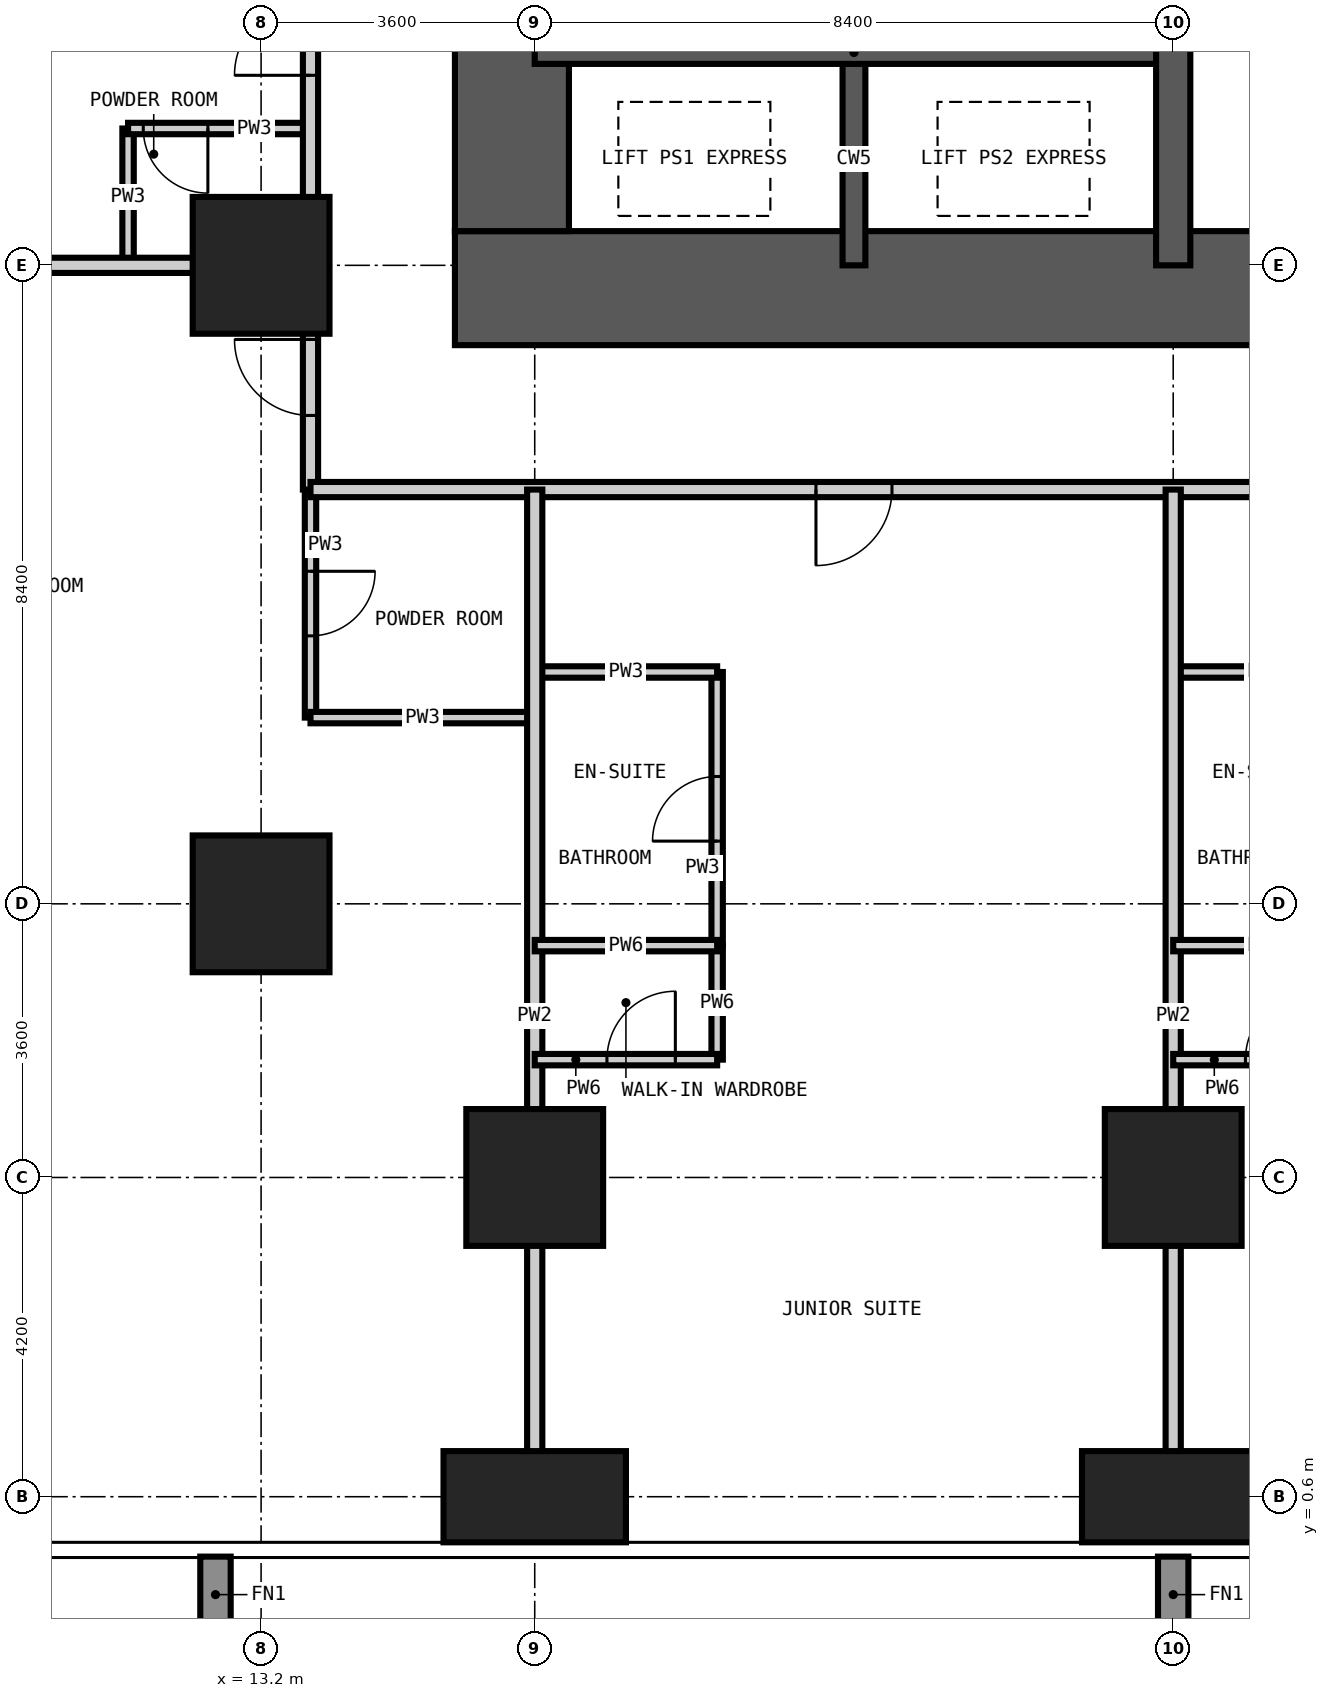
"""IFC4 building model, lengths in metres.
Left out: names, types, materials, properties, quantities, classifications, styles, units other than length and angle.
Written with IfcOpenShell. Run it as: python <this file> out.ifc"""

import sys

from ifc_helpers import new_model, si_unit, direction, frame, frame_2d, origin, origin_2d, place, context, subcontext, project, spatial, rectangle, extrude, element, fill, save


model = new_model("IFC4")
c1 = context("Model", 3, precision=1e-05, world=origin(), true_north=direction((0.0, 1.0)))
c2 = subcontext(c1, "Body", "Model", "MODEL_VIEW")
j1 = project(units=[si_unit("LENGTHUNIT", "METRE"), si_unit("PLANEANGLEUNIT", "RADIAN")], contexts=[c1])
p1 = place(None, origin())
s1 = spatial("IfcSite", under=j1, at=p1, CompositionType="ELEMENT")
p2 = place(p1, origin())
s2 = spatial("IfcBuilding", under=s1, at=p2, CompositionType="ELEMENT")
p3 = place(p2, frame((0.0, 0.0, 55.8)))
s3 = spatial("IfcBuildingStorey", under=s2, at=p3, CompositionType="ELEMENT", Elevation=55.8)
for number, where, z_axis, x_axis in (
    (1, (13.2, 8.4, -0.35), (0.0, 0.0, 1.0), (1.0, 0.0, 0.0)),
    (2, (13.2, 16.8, -0.35), (0.0, 0.0, 1.0), (1.0, 0.0, 0.0)),
):
    element("IfcColumn", number, at=place(p3, frame(where, z_axis=z_axis, x_axis=x_axis)), inside=s3, PredefinedType="COLUMN", context=c2, shape_type="SweptSolid", body=[
        extrude(rectangle(XDim=1.8, YDim=1.8, at=origin_2d()), origin(), (0.0, 0.0, 1.0), 3.6),
    ])
p4 = place(p3, frame((16.8, 0.6, -0.35), z_axis=(0.0, 0.0, 1.0), x_axis=(1.0, 0.0, 0.0)))
e3 = element("IfcColumn", 3, at=p4, inside=s3, PredefinedType="COLUMN", context=c2, shape_type="SweptSolid", body=[
    extrude(rectangle(XDim=2.4, YDim=1.2, at=origin_2d()), origin(), (0.0, 0.0, 1.0), 3.6),
])
p5 = place(p3, frame((16.8, 4.8, -0.35), z_axis=(0.0, 0.0, 1.0), x_axis=(1.0, 0.0, 0.0)))
e4 = element("IfcColumn", 4, at=p5, inside=s3, PredefinedType="COLUMN", context=c2, shape_type="SweptSolid", body=[
    extrude(rectangle(XDim=1.8, YDim=1.8, at=origin_2d()), origin(), (0.0, 0.0, 1.0), 3.6),
])
p6 = place(p3, frame((25.2, 0.6, -0.35), z_axis=(0.0, 0.0, 1.0), x_axis=(1.0, 0.0, 0.0)))
e5 = element("IfcColumn", 5, at=p6, inside=s3, PredefinedType="COLUMN", context=c2, shape_type="SweptSolid", body=[
    extrude(rectangle(XDim=2.4, YDim=1.2, at=origin_2d()), origin(), (0.0, 0.0, 1.0), 3.6),
])
p7 = place(p3, frame((25.2, 4.8, -0.35), z_axis=(0.0, 0.0, 1.0), x_axis=(1.0, 0.0, 0.0)))
e6 = element("IfcColumn", 6, at=p7, inside=s3, PredefinedType="COLUMN", context=c2, shape_type="SweptSolid", body=[
    extrude(rectangle(XDim=1.8, YDim=1.8, at=origin_2d()), origin(), (0.0, 0.0, 1.0), 3.6),
])
p8 = place(p3, frame((15.75, 16.5, -0.35), z_axis=(0.0, 0.0, 1.0), x_axis=(1.0, 0.0, 0.0)))
e7 = element("IfcWall", 7, at=p8, inside=s3, PredefinedType="SHEAR", context=c2, shape_type="SweptSolid", body=[
    extrude(rectangle(XDim=27.3, YDim=1.5, at=frame_2d((13.65, 0.0))), origin(), (0.0, 0.0, 1.0), 3.6),
])
p9 = place(p8, frame((13.15, 0.0, 0.35)))
e8 = element("IfcOpeningElement", 8, at=p9, cuts=e7, PredefinedType="OPENING", context=c2, shape_type="SweptSolid", body=[
    extrude(rectangle(XDim=1.0, YDim=2.1, at=frame_2d((0.5, 1.05))), frame((0.0, 0.76, 0.0), z_axis=(0.0, -1.0, 0.0), x_axis=(1.0, 0.0, 0.0)), (0.0, 0.0, 1.0), 1.52),
])
p10 = place(p8, frame((19.45, 0.0, 0.35)))
e9 = element("IfcOpeningElement", 9, at=p10, cuts=e7, PredefinedType="OPENING", context=c2, shape_type="SweptSolid", body=[
    extrude(rectangle(XDim=1.0, YDim=2.1, at=frame_2d((0.5, 1.05))), frame((0.0, 0.76, 0.0), z_axis=(0.0, -1.0, 0.0), x_axis=(1.0, 0.0, 0.0)), (0.0, 0.0, 1.0), 1.52),
])
p11 = place(p3, frame((16.5, 41.55, -0.35), z_axis=(0.0, 0.0, 1.0), x_axis=(0.0, -1.0, 0.0)))
e10 = element("IfcWall", 10, at=p11, inside=s3, PredefinedType="SHEAR", context=c2, shape_type="SweptSolid", body=[
    extrude(rectangle(XDim=24.3, YDim=1.5, at=frame_2d((12.15, 0.0))), origin(), (0.0, 0.0, 1.0), 3.6),
])
p12 = place(p11, frame((11.25, 0.0, 0.35)))
e11 = element("IfcOpeningElement", 11, at=p12, cuts=e10, PredefinedType="OPENING", context=c2, shape_type="SweptSolid", body=[
    extrude(rectangle(XDim=1.8, YDim=2.2, at=frame_2d((0.9, 1.1))), frame((0.0, 0.76, 0.0), z_axis=(0.0, -1.0, 0.0), x_axis=(1.0, 0.0, 0.0)), (0.0, 0.0, 1.0), 1.52),
])
p13 = place(p11, frame((20.05, 0.0, 0.35)))
e12 = element("IfcOpeningElement", 12, at=p13, cuts=e10, PredefinedType="OPENING", context=c2, shape_type="SweptSolid", body=[
    extrude(rectangle(XDim=1.0, YDim=2.1, at=frame_2d((0.5, 1.05))), frame((0.0, 0.76, 0.0), z_axis=(0.0, -1.0, 0.0), x_axis=(1.0, 0.0, 0.0)), (0.0, 0.0, 1.0), 1.52),
])
p14 = place(p11, frame((5.35, 0.0, 0.35)))
e13 = element("IfcOpeningElement", 13, at=p14, cuts=e10, PredefinedType="OPENING", context=c2, shape_type="SweptSolid", body=[
    extrude(rectangle(XDim=1.0, YDim=2.1, at=frame_2d((0.5, 1.05))), frame((0.0, 0.76, 0.0), z_axis=(0.0, -1.0, 0.0), x_axis=(1.0, 0.0, 0.0)), (0.0, 0.0, 1.0), 1.52),
])
p15 = place(p3, frame((21.0, 16.8, -0.35), z_axis=(0.0, 0.0, 1.0), x_axis=(0.0, 1.0, 0.0)))
e14 = element("IfcWall", 14, at=p15, inside=s3, PredefinedType="SHEAR", context=c2, shape_type="SweptSolid", body=[
    extrude(rectangle(XDim=2.8, YDim=0.3, at=frame_2d((1.4, 0.0))), origin(), (0.0, 0.0, 1.0), 3.6),
])
p16 = place(p3, frame((16.8, 19.6, -0.35), z_axis=(0.0, 0.0, 1.0), x_axis=(1.0, 0.0, 0.0)))
e15 = element("IfcWall", 15, at=p16, inside=s3, PredefinedType="SHEAR", context=c2, shape_type="SweptSolid", body=[
    extrude(rectangle(XDim=8.4, YDim=0.3, at=frame_2d((4.2, 0.0))), origin(), (0.0, 0.0, 1.0), 3.6),
])
p17 = place(p3, frame((25.2, 16.8, -0.35), z_axis=(0.0, 0.0, 1.0), x_axis=(0.0, 1.0, 0.0)))
e16 = element("IfcWall", 16, at=p17, inside=s3, PredefinedType="SHEAR", context=c2, shape_type="SweptSolid", body=[
    extrude(rectangle(XDim=25.2, YDim=0.45, at=frame_2d((12.6, 0.0))), origin(), (0.0, 0.0, 1.0), 3.6),
])
p18 = place(p3, frame((11.45, 16.8, 0.0), z_axis=(0.0, 0.0, 1.0), x_axis=(0.0, 1.0, 0.0)))
e17 = element("IfcWall", 17, at=p18, inside=s3, PredefinedType="PARTITIONING", context=c2, shape_type="SweptSolid", body=[
    extrude(rectangle(XDim=1.8, YDim=0.15, at=frame_2d((0.9, 0.0))), origin(), (0.0, 0.0, 1.0), 3.25),
])
p19 = place(p3, frame((13.85, 10.85, 0.0), z_axis=(0.0, 0.0, 1.0), x_axis=(0.0, 1.0, 0.0)))
e18 = element("IfcWall", 18, at=p19, inside=s3, PredefinedType="PARTITIONING", context=c2, shape_type="SweptSolid", body=[
    extrude(rectangle(XDim=3.0, YDim=0.15, at=frame_2d((1.5, 0.0))), origin(), (0.0, 0.0, 1.0), 3.25),
])
p20 = place(p19, frame((1.075, 0.0, 0.0)))
e19 = element("IfcOpeningElement", 19, at=p20, cuts=e18, PredefinedType="OPENING", context=c2, shape_type="SweptSolid", body=[
    extrude(rectangle(XDim=0.85, YDim=2.1, at=frame_2d((0.425, 1.05))), frame((0.0, 0.085, 0.0), z_axis=(0.0, -1.0, 0.0), x_axis=(1.0, 0.0, 0.0)), (0.0, 0.0, 1.0), 0.17),
])
p21 = place(p3, frame((19.2, 7.85, 0.0), z_axis=(0.0, 0.0, 1.0), x_axis=(0.0, 1.0, 0.0)))
e20 = element("IfcWall", 20, at=p21, inside=s3, PredefinedType="PARTITIONING", context=c2, shape_type="SweptSolid", body=[
    extrude(rectangle(XDim=3.6, YDim=0.15, at=frame_2d((1.8, 0.0))), origin(), (0.0, 0.0, 1.0), 3.25),
])
p22 = place(p21, frame((1.375, 0.0, 0.0)))
e21 = element("IfcOpeningElement", 21, at=p22, cuts=e20, PredefinedType="OPENING", context=c2, shape_type="SweptSolid", body=[
    extrude(rectangle(XDim=0.85, YDim=2.1, at=frame_2d((0.425, 1.05))), frame((0.0, 0.085, 0.0), z_axis=(0.0, -1.0, 0.0), x_axis=(1.0, 0.0, 0.0)), (0.0, 0.0, 1.0), 0.17),
])
p23 = place(p3, frame((13.85, 10.85, 0.0), z_axis=(0.0, 0.0, 1.0), x_axis=(1.0, 0.0, 0.0)))
e22 = element("IfcWall", 22, at=p23, inside=s3, PredefinedType="PARTITIONING", context=c2, shape_type="SweptSolid", body=[
    extrude(rectangle(XDim=2.95, YDim=0.15, at=frame_2d((1.475, 0.0))), origin(), (0.0, 0.0, 1.0), 3.25),
])
p24 = place(p3, frame((16.8, 11.45, 0.0), z_axis=(0.0, 0.0, 1.0), x_axis=(1.0, 0.0, 0.0)))
e23 = element("IfcWall", 23, at=p24, inside=s3, PredefinedType="PARTITIONING", context=c2, shape_type="SweptSolid", body=[
    extrude(rectangle(XDim=2.4, YDim=0.15, at=frame_2d((1.2, 0.0))), origin(), (0.0, 0.0, 1.0), 3.25),
])
p25 = place(p3, frame((25.2, 11.45, 0.0), z_axis=(0.0, 0.0, 1.0), x_axis=(1.0, 0.0, 0.0)))
e24 = element("IfcWall", 24, at=p25, inside=s3, PredefinedType="PARTITIONING", context=c2, shape_type="SweptSolid", body=[
    extrude(rectangle(XDim=2.4, YDim=0.15, at=frame_2d((1.2, 0.0))), origin(), (0.0, 0.0, 1.0), 3.25),
])
p26 = place(p3, frame((11.45, 18.6, 0.0), z_axis=(0.0, 0.0, 1.0), x_axis=(1.0, 0.0, 0.0)))
e25 = element("IfcWall", 25, at=p26, inside=s3, PredefinedType="PARTITIONING", context=c2, shape_type="SweptSolid", body=[
    extrude(rectangle(XDim=2.4, YDim=0.15, at=frame_2d((1.2, 0.0))), origin(), (0.0, 0.0, 1.0), 3.25),
])
p27 = place(p26, frame((0.2, 0.0, 0.0)))
e26 = element("IfcOpeningElement", 26, at=p27, cuts=e25, PredefinedType="OPENING", context=c2, shape_type="SweptSolid", body=[
    extrude(rectangle(XDim=0.85, YDim=2.1, at=frame_2d((0.425, 1.05))), frame((0.0, 0.085, 0.0), z_axis=(0.0, -1.0, 0.0), x_axis=(1.0, 0.0, 0.0)), (0.0, 0.0, 1.0), 0.17),
])
p28 = place(p3, frame((13.85, 13.85, 0.0), z_axis=(0.0, 0.0, 1.0), x_axis=(0.0, 1.0, 0.0)))
e27 = element("IfcWall", 27, at=p28, inside=s3, PredefinedType="PARTITIONING", context=c2, shape_type="SweptSolid", body=[
    extrude(rectangle(XDim=32.3, YDim=0.2, at=frame_2d((16.15, 0.0))), origin(), (0.0, 0.0, 1.0), 3.25),
])
p29 = place(p28, frame((5.45, 0.0, 0.0)))
e28 = element("IfcOpeningElement", 28, at=p29, cuts=e27, PredefinedType="OPENING", context=c2, shape_type="SweptSolid", body=[
    extrude(rectangle(XDim=1.0, YDim=2.2, at=frame_2d((0.5, 1.1))), frame((0.0, 0.11, 0.0), z_axis=(0.0, -1.0, 0.0), x_axis=(1.0, 0.0, 0.0)), (0.0, 0.0, 1.0), 0.22),
])
p30 = place(p28, frame((13.85, 0.0, 0.0)))
e29 = element("IfcOpeningElement", 29, at=p30, cuts=e27, PredefinedType="OPENING", context=c2, shape_type="SweptSolid", body=[
    extrude(rectangle(XDim=1.0, YDim=2.2, at=frame_2d((0.5, 1.1))), frame((0.0, 0.11, 0.0), z_axis=(0.0, -1.0, 0.0), x_axis=(1.0, 0.0, 0.0)), (0.0, 0.0, 1.0), 0.22),
])
p31 = place(p28, frame((22.25, 0.0, 0.0)))
e30 = element("IfcOpeningElement", 30, at=p31, cuts=e27, PredefinedType="OPENING", context=c2, shape_type="SweptSolid", body=[
    extrude(rectangle(XDim=1.0, YDim=2.2, at=frame_2d((0.5, 1.1))), frame((0.0, 0.11, 0.0), z_axis=(0.0, -1.0, 0.0), x_axis=(1.0, 0.0, 0.0)), (0.0, 0.0, 1.0), 0.22),
])
p32 = place(p28, frame((0.975, 0.0, 0.0)))
e31 = element("IfcOpeningElement", 31, at=p32, cuts=e27, PredefinedType="OPENING", context=c2, shape_type="SweptSolid", body=[
    extrude(rectangle(XDim=1.0, YDim=2.2, at=frame_2d((0.5, 1.1))), frame((0.0, 0.11, 0.0), z_axis=(0.0, -1.0, 0.0), x_axis=(1.0, 0.0, 0.0)), (0.0, 0.0, 1.0), 0.22),
])
p33 = place(p28, frame((29.725, 0.0, 0.0)))
e32 = element("IfcOpeningElement", 32, at=p33, cuts=e27, PredefinedType="OPENING", context=c2, shape_type="SweptSolid", body=[
    extrude(rectangle(XDim=1.0, YDim=2.2, at=frame_2d((0.5, 1.1))), frame((0.0, 0.11, 0.0), z_axis=(0.0, -1.0, 0.0), x_axis=(1.0, 0.0, 0.0)), (0.0, 0.0, 1.0), 0.22),
])
p34 = place(p3, frame((45.55, 13.85, 0.0), z_axis=(0.0, 0.0, 1.0), x_axis=(-1.0, 0.0, 0.0)))
e33 = element("IfcWall", 33, at=p34, inside=s3, PredefinedType="PARTITIONING", context=c2, shape_type="SweptSolid", body=[
    extrude(rectangle(XDim=31.7, YDim=0.2, at=frame_2d((15.85, 0.0))), origin(), (0.0, 0.0, 1.0), 3.25),
])
p35 = place(p34, frame((24.05, 0.0, 0.0)))
e34 = element("IfcOpeningElement", 34, at=p35, cuts=e33, PredefinedType="OPENING", context=c2, shape_type="SweptSolid", body=[
    extrude(rectangle(XDim=1.0, YDim=2.2, at=frame_2d((0.5, 1.1))), frame((0.0, 0.11, 0.0), z_axis=(0.0, -1.0, 0.0), x_axis=(1.0, 0.0, 0.0)), (0.0, 0.0, 1.0), 0.22),
])
p36 = place(p34, frame((15.65, 0.0, 0.0)))
e35 = element("IfcOpeningElement", 35, at=p36, cuts=e33, PredefinedType="OPENING", context=c2, shape_type="SweptSolid", body=[
    extrude(rectangle(XDim=1.0, YDim=2.2, at=frame_2d((0.5, 1.1))), frame((0.0, 0.11, 0.0), z_axis=(0.0, -1.0, 0.0), x_axis=(1.0, 0.0, 0.0)), (0.0, 0.0, 1.0), 0.22),
])
p37 = place(p34, frame((7.25, 0.0, 0.0)))
e36 = element("IfcOpeningElement", 36, at=p37, cuts=e33, PredefinedType="OPENING", context=c2, shape_type="SweptSolid", body=[
    extrude(rectangle(XDim=1.0, YDim=2.2, at=frame_2d((0.5, 1.1))), frame((0.0, 0.11, 0.0), z_axis=(0.0, -1.0, 0.0), x_axis=(1.0, 0.0, 0.0)), (0.0, 0.0, 1.0), 0.22),
])
for number, where, z_axis, x_axis in (
    (37, (16.8, -0.008, 0.0), (0.0, 0.0, 1.0), (0.0, 1.0, 0.0)),
    (38, (25.2, -0.008, 0.0), (0.0, 0.0, 1.0), (0.0, 1.0, 0.0)),
    (39, (-0.008, 16.8, 0.0), (0.0, 0.0, 1.0), (1.0, 0.0, 0.0)),
):
    element("IfcWall", number, at=place(p3, frame(where, z_axis=z_axis, x_axis=x_axis)), inside=s3, PredefinedType="PARTITIONING", context=c2, shape_type="SweptSolid", body=[
        extrude(rectangle(XDim=13.858, YDim=0.2, at=frame_2d((6.929, 0.0))), origin(), (0.0, 0.0, 1.0), 3.25),
    ])
p38 = place(p3, frame((19.2, 6.35, 0.0), z_axis=(0.0, 0.0, 1.0), x_axis=(0.0, 1.0, 0.0)))
e40 = element("IfcWall", 40, at=p38, inside=s3, PredefinedType="PARTITIONING", context=c2, shape_type="SweptSolid", body=[
    extrude(rectangle(XDim=1.5, YDim=0.15, at=frame_2d((0.75, 0.0))), origin(), (0.0, 0.0, 1.0), 3.25),
])
p39 = place(p3, frame((16.8, 6.35, 0.0), z_axis=(0.0, 0.0, 1.0), x_axis=(1.0, 0.0, 0.0)))
e41 = element("IfcWall", 41, at=p39, inside=s3, PredefinedType="PARTITIONING", context=c2, shape_type="SweptSolid", body=[
    extrude(rectangle(XDim=2.4, YDim=0.15, at=frame_2d((1.2, 0.0))), origin(), (0.0, 0.0, 1.0), 3.25),
])
p40 = place(p39, frame((0.95, 0.0, 0.0)))
e42 = element("IfcOpeningElement", 42, at=p40, cuts=e41, PredefinedType="OPENING", context=c2, shape_type="SweptSolid", body=[
    extrude(rectangle(XDim=0.9, YDim=2.1, at=frame_2d((0.45, 1.05))), frame((0.0, 0.085, 0.0), z_axis=(0.0, -1.0, 0.0), x_axis=(1.0, 0.0, 0.0)), (0.0, 0.0, 1.0), 0.17),
])
p41 = place(p3, frame((25.2, 6.35, 0.0), z_axis=(0.0, 0.0, 1.0), x_axis=(1.0, 0.0, 0.0)))
e43 = element("IfcWall", 43, at=p41, inside=s3, PredefinedType="PARTITIONING", context=c2, shape_type="SweptSolid", body=[
    extrude(rectangle(XDim=2.4, YDim=0.15, at=frame_2d((1.2, 0.0))), origin(), (0.0, 0.0, 1.0), 3.25),
])
p42 = place(p41, frame((0.95, 0.0, 0.0)))
e44 = element("IfcOpeningElement", 44, at=p42, cuts=e43, PredefinedType="OPENING", context=c2, shape_type="SweptSolid", body=[
    extrude(rectangle(XDim=0.9, YDim=2.1, at=frame_2d((0.45, 1.05))), frame((0.0, 0.085, 0.0), z_axis=(0.0, -1.0, 0.0), x_axis=(1.0, 0.0, 0.0)), (0.0, 0.0, 1.0), 0.17),
])
p43 = place(p3, frame((16.8, 7.85, 0.0), z_axis=(0.0, 0.0, 1.0), x_axis=(1.0, 0.0, 0.0)))
e45 = element("IfcWall", 45, at=p43, inside=s3, PredefinedType="PARTITIONING", context=c2, shape_type="SweptSolid", body=[
    extrude(rectangle(XDim=2.4, YDim=0.15, at=frame_2d((1.2, 0.0))), origin(), (0.0, 0.0, 1.0), 3.25),
])
p44 = place(p3, frame((25.2, 7.85, 0.0), z_axis=(0.0, 0.0, 1.0), x_axis=(1.0, 0.0, 0.0)))
e46 = element("IfcWall", 46, at=p44, inside=s3, PredefinedType="PARTITIONING", context=c2, shape_type="SweptSolid", body=[
    extrude(rectangle(XDim=2.4, YDim=0.15, at=frame_2d((1.2, 0.0))), origin(), (0.0, 0.0, 1.0), 3.25),
])
p45 = place(p35, origin())
e47 = element("IfcDoor", 47, at=p45, inside=s3, OperationType="SINGLE_SWING_RIGHT", PredefinedType="DOOR", context=c2, shape_type="SweptSolid", body=[
    extrude(rectangle(XDim=1.0, YDim=2.2, at=frame_2d((0.5, 1.1))), frame((0.0, 0.025, 0.0), z_axis=(0.0, -1.0, 0.0), x_axis=(1.0, 0.0, 0.0)), (0.0, 0.0, 1.0), 0.05),
])
fill(e34, e47)
p46 = place(p22, origin())
e48 = element("IfcDoor", 48, at=p46, inside=s3, OperationType="SINGLE_SWING_LEFT", PredefinedType="DOOR", context=c2, shape_type="SweptSolid", body=[
    extrude(rectangle(XDim=0.85, YDim=2.1, at=frame_2d((0.425, 1.05))), frame((0.0, 0.025, 0.0), z_axis=(0.0, -1.0, 0.0), x_axis=(1.0, 0.0, 0.0)), (0.0, 0.0, 1.0), 0.05),
])
fill(e21, e48)
p47 = place(p40, origin())
e49 = element("IfcDoor", 49, at=p47, inside=s3, OperationType="SINGLE_SWING_RIGHT", PredefinedType="DOOR", context=c2, shape_type="SweptSolid", body=[
    extrude(rectangle(XDim=0.9, YDim=2.1, at=frame_2d((0.45, 1.05))), frame((0.0, 0.025, 0.0), z_axis=(0.0, -1.0, 0.0), x_axis=(1.0, 0.0, 0.0)), (0.0, 0.0, 1.0), 0.05),
])
fill(e42, e49)
p48 = place(p42, origin())
e50 = element("IfcDoor", 50, at=p48, inside=s3, OperationType="SINGLE_SWING_RIGHT", PredefinedType="DOOR", context=c2, shape_type="SweptSolid", body=[
    extrude(rectangle(XDim=0.9, YDim=2.1, at=frame_2d((0.45, 1.05))), frame((0.0, 0.025, 0.0), z_axis=(0.0, -1.0, 0.0), x_axis=(1.0, 0.0, 0.0)), (0.0, 0.0, 1.0), 0.05),
])
fill(e44, e50)
p49 = place(p29, origin())
e51 = element("IfcDoor", 51, at=p49, inside=s3, OperationType="SINGLE_SWING_LEFT", PredefinedType="DOOR", context=c2, shape_type="SweptSolid", body=[
    extrude(rectangle(XDim=1.0, YDim=2.2, at=frame_2d((0.5, 1.1))), frame((0.0, 0.025, 0.0), z_axis=(0.0, -1.0, 0.0), x_axis=(1.0, 0.0, 0.0)), (0.0, 0.0, 1.0), 0.05),
])
fill(e28, e51)
p50 = place(p27, frame((0.85, 0.0, 0.0), z_axis=(0.0, 0.0, 1.0), x_axis=(-1.0, 0.0, 0.0)))
e52 = element("IfcDoor", 52, at=p50, inside=s3, OperationType="SINGLE_SWING_LEFT", PredefinedType="DOOR", context=c2, shape_type="SweptSolid", body=[
    extrude(rectangle(XDim=0.85, YDim=2.1, at=frame_2d((0.425, 1.05))), frame((0.0, 0.025, 0.0), z_axis=(0.0, -1.0, 0.0), x_axis=(1.0, 0.0, 0.0)), (0.0, 0.0, 1.0), 0.05),
])
fill(e26, e52)
p51 = place(p32, origin())
e53 = element("IfcDoor", 53, at=p51, inside=s3, OperationType="SINGLE_SWING_RIGHT", PredefinedType="DOOR", context=c2, shape_type="SweptSolid", body=[
    extrude(rectangle(XDim=1.0, YDim=2.2, at=frame_2d((0.5, 1.1))), frame((0.0, 0.025, 0.0), z_axis=(0.0, -1.0, 0.0), x_axis=(1.0, 0.0, 0.0)), (0.0, 0.0, 1.0), 0.05),
])
fill(e31, e53)
p52 = place(p20, frame((0.85, 0.0, 0.0), z_axis=(0.0, 0.0, 1.0), x_axis=(-1.0, 0.0, 0.0)))
e54 = element("IfcDoor", 54, at=p52, inside=s3, OperationType="SINGLE_SWING_LEFT", PredefinedType="DOOR", context=c2, shape_type="SweptSolid", body=[
    extrude(rectangle(XDim=0.85, YDim=2.1, at=frame_2d((0.425, 1.05))), frame((0.0, 0.025, 0.0), z_axis=(0.0, -1.0, 0.0), x_axis=(1.0, 0.0, 0.0)), (0.0, 0.0, 1.0), 0.05),
])
fill(e19, e54)
save(model, sys.argv[1])
